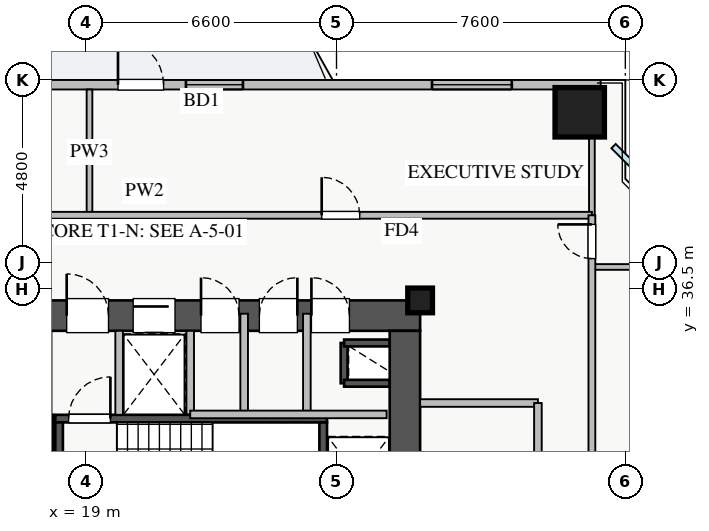
"""IFC4 building model, lengths in metres.
Left out: names, types, materials, properties, quantities, classifications, styles, units other than length and angle.
Written with IfcOpenShell. Run it as: python <this file> out.ifc"""

import sys

from ifc_helpers import new_model, si_unit, direction, frame, frame_2d, origin, origin_2d, place, context, subcontext, project, spatial, rectangle, extrude, source, transform, mapped, element, fill, save


model = new_model("IFC4")
c1 = context("Model", 3, precision=1e-05, world=origin(), true_north=direction((0.0, 1.0)))
c2 = subcontext(c1, "Body", "Model", "MODEL_VIEW")
j1 = project(units=[si_unit("LENGTHUNIT", "METRE"), si_unit("PLANEANGLEUNIT", "RADIAN")], contexts=[c1])
p1 = place(None, origin())
s1 = spatial("IfcSite", under=j1, at=p1, CompositionType="ELEMENT")
p2 = place(p1, origin())
s2 = spatial("IfcBuilding", under=s1, at=p2, CompositionType="ELEMENT")
p3 = place(p2, frame((0.0, 0.0, 29.5)))
s3 = spatial("IfcBuildingStorey", under=s2, at=p3, CompositionType="ELEMENT", Elevation=29.5)
p4 = place(p3, frame((25.8, 34.02, 0.0), z_axis=(0.0, 0.0, 1.0), x_axis=(0.0, 1.0, 0.0)))
e1 = element("IfcWall", 1, at=p4, inside=s3, PredefinedType="SHEAR", context=c2, shape_type="SweptSolid", body=[
    extrude(rectangle(XDim=1.06, YDim=0.18, at=frame_2d((0.53, 0.0))), origin(), (0.0, 0.0, 1.0), 3.07),
])
for number, where, z_axis, x_axis in (
    (2, (25.8, 35.08, 0.0), (0.0, 0.0, 1.0), (1.0, 0.0, 0.0)),
    (3, (25.8, 34.02, 0.0), (0.0, 0.0, 1.0), (1.0, 0.0, 0.0)),
):
    element("IfcWall", number, at=place(p3, frame(where, z_axis=z_axis, x_axis=x_axis)), inside=s3, PredefinedType="SHEAR", context=c2, shape_type="SweptSolid", body=[
        extrude(rectangle(XDim=1.2, YDim=0.18, at=frame_2d((0.6, 0.0))), origin(), (0.0, 0.0, 1.0), 3.07),
    ])
p5 = place(p3, frame((19.88, 33.2, 0.0), z_axis=(0.0, 0.0, 1.0), x_axis=(1.0, 0.0, 0.0)))
e4 = element("IfcWall", 4, at=p5, inside=s3, PredefinedType="SHEAR", context=c2, shape_type="SweptSolid", body=[
    extrude(rectangle(XDim=1.87, YDim=0.18, at=frame_2d((0.935, 0.0))), origin(), (0.0, 0.0, 1.0), 3.07),
])
p6 = place(p3, frame((11.0, 33.09, 0.0), z_axis=(0.0, 0.0, 1.0), x_axis=(1.0, 0.0, 0.0)))
e5 = element("IfcWall", 5, at=p6, inside=s3, PredefinedType="SHEAR", context=c2, shape_type="SweptSolid", body=[
    extrude(rectangle(XDim=7.15, YDim=0.2, at=frame_2d((3.575, 0.0))), origin(), (0.0, 0.0, 1.0), 3.25),
])
p7 = place(p6, frame((0.35, 0.0, 0.0)))
e6 = element("IfcOpeningElement", 6, at=p7, cuts=e5, PredefinedType="OPENING", context=c2, shape_type="SweptSolid", body=[
    extrude(rectangle(XDim=1.1, YDim=2.05, at=frame_2d((0.55, 1.025))), frame((0.0, 0.11, 0.0), z_axis=(0.0, -1.0, 0.0), x_axis=(1.0, 0.0, 0.0)), (0.0, 0.0, 1.0), 0.22),
])
p8 = place(p3, frame((18.05, 30.05, 0.0), z_axis=(0.0, 0.0, 1.0), x_axis=(0.0, 1.0, 0.0)))
e7 = element("IfcWall", 7, at=p8, inside=s3, PredefinedType="SHEAR", context=c2, shape_type="SweptSolid", body=[
    extrude(rectangle(XDim=2.94, YDim=0.2, at=frame_2d((1.47, 0.0))), origin(), (0.0, 0.0, 1.0), 3.25),
])
p9 = place(p3, frame((18.2, 33.09, 0.0), z_axis=(0.0, 0.0, 1.0), x_axis=(1.0, 0.0, 0.0)))
e8 = element("IfcWall", 8, at=p9, inside=s3, PredefinedType="SHEAR", context=c2, shape_type="SweptSolid", body=[
    extrude(rectangle(XDim=7.15, YDim=0.2, at=frame_2d((3.575, 0.0))), origin(), (0.0, 0.0, 1.0), 3.25),
])
p10 = place(p9, frame((0.35, 0.0, 0.0)))
e9 = element("IfcOpeningElement", 9, at=p10, cuts=e8, PredefinedType="OPENING", context=c2, shape_type="SweptSolid", body=[
    extrude(rectangle(XDim=1.1, YDim=2.05, at=frame_2d((0.55, 1.025))), frame((0.0, 0.11, 0.0), z_axis=(0.0, -1.0, 0.0), x_axis=(1.0, 0.0, 0.0)), (0.0, 0.0, 1.0), 0.22),
])
for number, where, z_axis, x_axis in (
    (10, (18.3, 30.05, 0.0), (0.0, 0.0, 1.0), (0.0, 1.0, 0.0)),
    (11, (25.25, 30.05, 0.0), (0.0, 0.0, 1.0), (0.0, 1.0, 0.0)),
):
    element("IfcWall", number, at=place(p3, frame(where, z_axis=z_axis, x_axis=x_axis)), inside=s3, PredefinedType="SHEAR", context=c2, shape_type="SweptSolid", body=[
        extrude(rectangle(XDim=2.94, YDim=0.2, at=frame_2d((1.47, 0.0))), origin(), (0.0, 0.0, 1.0), 3.25),
    ])
p11 = place(p3, frame((10.2, 35.8, 0.0), z_axis=(0.0, 0.0, 1.0), x_axis=(1.0, 0.0, 0.0)))
e12 = element("IfcWall", 12, at=p11, inside=s3, PredefinedType="SHEAR", context=c2, shape_type="SweptSolid", body=[
    extrude(rectangle(XDim=17.6, YDim=0.8, at=frame_2d((8.8, 0.0))), origin(), (0.0, 0.0, 1.0), 3.25),
])
p12 = place(p11, frame((1.15, 0.0, 0.0)))
e13 = element("IfcOpeningElement", 13, at=p12, cuts=e12, PredefinedType="OPENING", context=c2, shape_type="SweptSolid", body=[
    extrude(rectangle(XDim=1.1, YDim=2.05, at=frame_2d((0.55, 1.025))), frame((0.0, 0.41, 0.0), z_axis=(0.0, -1.0, 0.0), x_axis=(1.0, 0.0, 0.0)), (0.0, 0.0, 1.0), 0.82),
])
p13 = place(p11, frame((8.3, 0.0, 0.0)))
e14 = element("IfcOpeningElement", 14, at=p13, cuts=e12, PredefinedType="OPENING", context=c2, shape_type="SweptSolid", body=[
    extrude(rectangle(XDim=1.1, YDim=2.05, at=frame_2d((0.55, 1.025))), frame((0.0, 0.41, 0.0), z_axis=(0.0, -1.0, 0.0), x_axis=(1.0, 0.0, 0.0)), (0.0, 0.0, 1.0), 0.82),
])
p14 = place(p11, frame((10.05, 0.0, 0.0)))
e15 = element("IfcOpeningElement", 15, at=p14, cuts=e12, PredefinedType="OPENING", context=c2, shape_type="SweptSolid", body=[
    extrude(rectangle(XDim=1.1, YDim=2.05, at=frame_2d((0.55, 1.025))), frame((0.0, 0.41, 0.0), z_axis=(0.0, -1.0, 0.0), x_axis=(1.0, 0.0, 0.0)), (0.0, 0.0, 1.0), 0.82),
])
p15 = place(p11, frame((14.74, 0.0, 0.0)))
e16 = element("IfcOpeningElement", 16, at=p15, cuts=e12, PredefinedType="OPENING", context=c2, shape_type="SweptSolid", body=[
    extrude(rectangle(XDim=1.0, YDim=2.05, at=frame_2d((0.5, 1.025))), frame((0.0, 0.41, 0.0), z_axis=(0.0, -1.0, 0.0), x_axis=(1.0, 0.0, 0.0)), (0.0, 0.0, 1.0), 0.82),
])
p16 = place(p11, frame((11.835, 0.0, 0.0)))
e17 = element("IfcOpeningElement", 17, at=p16, cuts=e12, PredefinedType="OPENING", context=c2, shape_type="SweptSolid", body=[
    extrude(rectangle(XDim=1.0, YDim=2.05, at=frame_2d((0.5, 1.025))), frame((0.0, 0.41, 0.0), z_axis=(0.0, -1.0, 0.0), x_axis=(1.0, 0.0, 0.0)), (0.0, 0.0, 1.0), 0.82),
])
p17 = place(p11, frame((13.37, 0.0, 0.0)))
e18 = element("IfcOpeningElement", 18, at=p17, cuts=e12, PredefinedType="OPENING", context=c2, shape_type="SweptSolid", body=[
    extrude(rectangle(XDim=1.0, YDim=2.05, at=frame_2d((0.5, 1.025))), frame((0.0, 0.41, 0.0), z_axis=(0.0, -1.0, 0.0), x_axis=(1.0, 0.0, 0.0)), (0.0, 0.0, 1.0), 0.82),
])
p18 = place(p3, frame((27.4, 29.8, 0.0), z_axis=(0.0, 0.0, 1.0), x_axis=(0.0, 1.0, 0.0)))
e19 = element("IfcWall", 19, at=p18, inside=s3, PredefinedType="SHEAR", context=c2, shape_type="SweptSolid", body=[
    extrude(rectangle(XDim=5.6, YDim=0.8, at=frame_2d((2.8, 0.0))), origin(), (0.0, 0.0, 1.0), 3.25),
])
p19 = place(p18, frame((1.1, 0.0, 0.0)))
e20 = element("IfcOpeningElement", 20, at=p19, cuts=e19, PredefinedType="OPENING", context=c2, shape_type="SweptSolid", body=[
    extrude(rectangle(XDim=1.3, YDim=2.05, at=frame_2d((0.65, 1.025))), frame((0.0, 0.41, 0.0), z_axis=(0.0, -1.0, 0.0), x_axis=(1.0, 0.0, 0.0)), (0.0, 0.0, 1.0), 0.82),
])
m1 = source(origin(), c2, "Body", "SweptSolid", [
    extrude(rectangle(XDim=0.65, YDim=0.65, at=origin_2d()), origin(), (0.0, 0.0, 1.0), 3.25),
])
p20 = place(p3, frame((27.8, 36.2, 0.0), z_axis=(0.0, 0.0, 1.0), x_axis=(1.0, 0.0, 0.0)))
e21 = element("IfcColumn", 21, at=p20, inside=s3, PredefinedType="PILASTER", context=c2, shape_type="MappedRepresentation", body=[
    mapped(m1, transform((0.0, 0.0, 0.0), x_axis=(1.0, 0.0, 0.0), y_axis=(0.0, 1.0, 0.0), z_axis=(0.0, 0.0, 1.0), scale=1.0)),
])
m2 = source(origin(), c2, "Body", "SweptSolid", [
    extrude(rectangle(XDim=1.3, YDim=1.3, at=origin_2d()), origin(), (0.0, 0.0, 1.0), 3.25),
])
p21 = place(p3, frame((32.0, 41.15, 0.0), z_axis=(0.0, 0.0, 1.0), x_axis=(1.0, 0.0, 0.0)))
e22 = element("IfcColumn", 22, at=p21, inside=s3, PredefinedType="COLUMN", context=c2, shape_type="MappedRepresentation", body=[
    mapped(m2, transform((0.0, 0.0, 0.0), x_axis=(1.0, 0.0, 0.0), y_axis=(0.0, 1.0, 0.0), z_axis=(0.0, 0.0, 1.0), scale=1.0)),
])
p22 = place(p3, frame((5.45, 41.875, 0.0), z_axis=(0.0, 0.0, 1.0), x_axis=(1.0, 0.0, 0.0)))
e23 = element("IfcWall", 23, at=p22, inside=s3, PredefinedType="STANDARD", context=c2, shape_type="SweptSolid", body=[
    extrude(rectangle(XDim=27.1, YDim=0.25, at=frame_2d((13.55, 0.0))), origin(), (0.0, 0.0, 1.0), 2.61),
])
p23 = place(p22, frame((14.4, 0.0, 0.0)))
e24 = element("IfcOpeningElement", 24, at=p23, cuts=e23, PredefinedType="OPENING", context=c2, shape_type="SweptSolid", body=[
    extrude(rectangle(XDim=1.2, YDim=2.1, at=frame_2d((0.6, 1.05))), frame((0.0, 0.135, 0.0), z_axis=(0.0, -1.0, 0.0), x_axis=(1.0, 0.0, 0.0)), (0.0, 0.0, 1.0), 0.27),
])
p24 = place(p22, frame((1.48, 0.0, 0.9)))
e25 = element("IfcOpeningElement", 25, at=p24, cuts=e23, PredefinedType="OPENING", context=c2, shape_type="SweptSolid", body=[
    extrude(rectangle(XDim=1.5, YDim=1.5, at=frame_2d((0.75, 0.75))), frame((0.0, 0.135, 0.0), z_axis=(0.0, -1.0, 0.0), x_axis=(1.0, 0.0, 0.0)), (0.0, 0.0, 1.0), 0.27),
])
p25 = place(p22, frame((9.263, 0.0, 0.9)))
e26 = element("IfcOpeningElement", 26, at=p25, cuts=e23, PredefinedType="OPENING", context=c2, shape_type="SweptSolid", body=[
    extrude(rectangle(XDim=1.8, YDim=1.45, at=frame_2d((0.9, 0.725))), frame((0.0, 0.135, 0.0), z_axis=(0.0, -1.0, 0.0), x_axis=(1.0, 0.0, 0.0)), (0.0, 0.0, 1.0), 0.27),
])
p26 = place(p22, frame((16.188, 0.0, 0.9)))
e27 = element("IfcOpeningElement", 27, at=p26, cuts=e23, PredefinedType="OPENING", context=c2, shape_type="SweptSolid", body=[
    extrude(rectangle(XDim=1.5, YDim=1.45, at=frame_2d((0.75, 0.725))), frame((0.0, 0.135, 0.0), z_axis=(0.0, -1.0, 0.0), x_axis=(1.0, 0.0, 0.0)), (0.0, 0.0, 1.0), 0.27),
])
p27 = place(p22, frame((22.663, 0.0, 0.9)))
e28 = element("IfcOpeningElement", 28, at=p27, cuts=e23, PredefinedType="OPENING", context=c2, shape_type="SweptSolid", body=[
    extrude(rectangle(XDim=2.1, YDim=1.48, at=frame_2d((1.05, 0.74))), frame((0.0, 0.135, 0.0), z_axis=(0.0, -1.0, 0.0), x_axis=(1.0, 0.0, 0.0)), (0.0, 0.0, 1.0), 0.27),
])
p28 = place(p22, frame((5.114, 0.0, 0.9)))
e29 = element("IfcOpeningElement", 29, at=p28, cuts=e23, PredefinedType="OPENING", context=c2, shape_type="SweptSolid", body=[
    extrude(rectangle(XDim=2.4, YDim=1.5, at=frame_2d((1.2, 0.75))), frame((0.0, 0.135, 0.0), z_axis=(0.0, -1.0, 0.0), x_axis=(1.0, 0.0, 0.0)), (0.0, 0.0, 1.0), 0.27),
])
p29 = place(p3, frame((27.8, 33.5, 0.0), z_axis=(0.0, 0.0, 1.0), x_axis=(1.0, 0.0, 0.0)))
e30 = element("IfcWall", 30, at=p29, inside=s3, PredefinedType="PARTITIONING", context=c2, shape_type="SweptSolid", body=[
    extrude(rectangle(XDim=3.1, YDim=0.2, at=frame_2d((1.55, 0.0))), origin(), (0.0, 0.0, 1.0), 3.07),
])
p30 = place(p3, frame((30.9, 29.6, 0.0), z_axis=(0.0, 0.0, 1.0), x_axis=(0.0, 1.0, 0.0)))
e31 = element("IfcWall", 31, at=p30, inside=s3, PredefinedType="PARTITIONING", context=c2, shape_type="SweptSolid", body=[
    extrude(rectangle(XDim=3.9, YDim=0.2, at=frame_2d((1.95, 0.0))), origin(), (0.0, 0.0, 1.0), 3.07),
])
p31 = place(p30, frame((1.4, 0.0, 0.0)))
e32 = element("IfcOpeningElement", 32, at=p31, cuts=e31, PredefinedType="OPENING", context=c2, shape_type="SweptSolid", body=[
    extrude(rectangle(XDim=1.1, YDim=2.05, at=frame_2d((0.55, 1.025))), frame((0.0, 0.11, 0.0), z_axis=(0.0, -1.0, 0.0), x_axis=(1.0, 0.0, 0.0)), (0.0, 0.0, 1.0), 0.22),
])
p32 = place(p3, frame((19.88, 33.19, 0.0), z_axis=(0.0, 0.0, 1.0), x_axis=(0.0, 1.0, 0.0)))
e33 = element("IfcWall", 33, at=p32, inside=s3, PredefinedType="PARTITIONING", context=c2, shape_type="SweptSolid", body=[
    extrude(rectangle(XDim=2.21, YDim=0.2, at=frame_2d((1.105, 0.0))), origin(), (0.0, 0.0, 1.0), 3.07),
])
p33 = place(p3, frame((24.82, 33.2, 0.0), z_axis=(0.0, 0.0, 1.0), x_axis=(0.0, 1.0, 0.0)))
e34 = element("IfcWall", 34, at=p33, inside=s3, PredefinedType="PARTITIONING", context=c2, shape_type="SweptSolid", body=[
    extrude(rectangle(XDim=2.65, YDim=0.2, at=frame_2d((1.325, 0.0))), origin(), (0.0, 0.0, 1.0), 3.07),
])
p34 = place(p3, frame((21.75, 33.2, 0.0), z_axis=(0.0, 0.0, 1.0), x_axis=(0.0, 1.0, 0.0)))
e35 = element("IfcWall", 35, at=p34, inside=s3, PredefinedType="PARTITIONING", context=c2, shape_type="SweptSolid", body=[
    extrude(rectangle(XDim=2.2, YDim=0.2, at=frame_2d((1.1, 0.0))), origin(), (0.0, 0.0, 1.0), 3.07),
])
p35 = place(p3, frame((23.17, 33.2, 0.0), z_axis=(0.0, 0.0, 1.0), x_axis=(0.0, 1.0, 0.0)))
e36 = element("IfcWall", 36, at=p35, inside=s3, PredefinedType="PARTITIONING", context=c2, shape_type="SweptSolid", body=[
    extrude(rectangle(XDim=2.65, YDim=0.2, at=frame_2d((1.325, 0.0))), origin(), (0.0, 0.0, 1.0), 3.07),
])
p36 = place(p3, frame((21.75, 33.2, 0.0), z_axis=(0.0, 0.0, 1.0), x_axis=(1.0, 0.0, 0.0)))
e37 = element("IfcWall", 37, at=p36, inside=s3, PredefinedType="PARTITIONING", context=c2, shape_type="SweptSolid", body=[
    extrude(rectangle(XDim=5.17, YDim=0.2, at=frame_2d((2.585, 0.0))), origin(), (0.0, 0.0, 1.0), 3.07),
])
p37 = place(p3, frame((19.1, 38.44, 0.0), z_axis=(0.0, 0.0, 1.0), x_axis=(0.0, 1.0, 0.0)))
e38 = element("IfcWall", 38, at=p37, inside=s3, PredefinedType="PARTITIONING", context=c2, shape_type="SweptSolid", body=[
    extrude(rectangle(XDim=3.31, YDim=0.15, at=frame_2d((1.655, 0.0))), origin(), (0.0, 0.0, 1.0), 2.765),
])
p38 = place(p3, frame((32.32, 38.44, 0.0), z_axis=(0.0, 0.0, 1.0), x_axis=(0.0, 1.0, 0.0)))
e39 = element("IfcWall", 39, at=p38, inside=s3, PredefinedType="PARTITIONING", context=c2, shape_type="SweptSolid", body=[
    extrude(rectangle(XDim=3.31, YDim=0.15, at=frame_2d((1.655, 0.0))), origin(), (0.0, 0.0, 1.0), 3.07),
])
p39 = place(p3, frame((8.78, 38.44, 0.0), z_axis=(0.0, 0.0, 1.0), x_axis=(1.0, 0.0, 0.0)))
e40 = element("IfcWall", 40, at=p39, inside=s3, PredefinedType="PARTITIONING", context=c2, shape_type="SweptSolid", body=[
    extrude(rectangle(XDim=23.54, YDim=0.18, at=frame_2d((11.77, 0.0))), origin(), (0.0, 0.0, 1.0), 3.07),
])
p40 = place(p39, frame((4.66, 0.0, 0.0)))
e41 = element("IfcOpeningElement", 41, at=p40, cuts=e40, PredefinedType="OPENING", context=c2, shape_type="SweptSolid", body=[
    extrude(rectangle(XDim=1.0, YDim=2.05, at=frame_2d((0.5, 1.025))), frame((0.0, 0.1, 0.0), z_axis=(0.0, -1.0, 0.0), x_axis=(1.0, 0.0, 0.0)), (0.0, 0.0, 1.0), 0.2),
])
p41 = place(p39, frame((16.43, 0.0, 0.0)))
e42 = element("IfcOpeningElement", 42, at=p41, cuts=e40, PredefinedType="OPENING", context=c2, shape_type="SweptSolid", body=[
    extrude(rectangle(XDim=1.0, YDim=2.05, at=frame_2d((0.5, 1.025))), frame((0.0, 0.1, 0.0), z_axis=(0.0, -1.0, 0.0), x_axis=(1.0, 0.0, 0.0)), (0.0, 0.0, 1.0), 0.2),
])
p42 = place(p3, frame((32.32, 37.08, 0.0), z_axis=(0.0, 0.0, 1.0), x_axis=(1.0, 0.0, 0.0)))
e43 = element("IfcWall", 43, at=p42, inside=s3, PredefinedType="PARTITIONING", context=c2, shape_type="SweptSolid", body=[
    extrude(rectangle(XDim=5.43, YDim=0.15, at=frame_2d((2.715, 0.0))), origin(), (0.0, 0.0, 1.0), 3.07),
])
p43 = place(p3, frame((32.32, 7.21, 0.0), z_axis=(0.0, 0.0, 1.0), x_axis=(0.0, 1.0, 0.0)))
e44 = element("IfcWall", 44, at=p43, inside=s3, PredefinedType="PARTITIONING", context=c2, shape_type="SweptSolid", body=[
    extrude(rectangle(XDim=31.23, YDim=0.18, at=frame_2d((15.615, 0.0))), origin(), (0.0, 0.0, 1.0), 2.765),
])
p44 = place(p43, frame((30.09, 0.0, 0.0)))
e45 = element("IfcOpeningElement", 45, at=p44, cuts=e44, PredefinedType="OPENING", context=c2, shape_type="SweptSolid", body=[
    extrude(rectangle(XDim=0.9, YDim=2.05, at=frame_2d((0.45, 1.025))), frame((0.0, 0.1, 0.0), z_axis=(0.0, -1.0, 0.0), x_axis=(1.0, 0.0, 0.0)), (0.0, 0.0, 1.0), 0.2),
])
p45 = place(p43, frame((0.415, 0.0, 0.0)))
e46 = element("IfcOpeningElement", 46, at=p45, cuts=e44, PredefinedType="OPENING", context=c2, shape_type="SweptSolid", body=[
    extrude(rectangle(XDim=0.9, YDim=2.05, at=frame_2d((0.45, 1.025))), frame((0.0, 0.1, 0.0), z_axis=(0.0, -1.0, 0.0), x_axis=(1.0, 0.0, 0.0)), (0.0, 0.0, 1.0), 0.2),
])
p46 = place(p43, frame((8.575, 0.0, 0.0)))
e47 = element("IfcOpeningElement", 47, at=p46, cuts=e44, PredefinedType="OPENING", context=c2, shape_type="SweptSolid", body=[
    extrude(rectangle(XDim=1.0, YDim=2.05, at=frame_2d((0.5, 1.025))), frame((0.0, 0.1, 0.0), z_axis=(0.0, -1.0, 0.0), x_axis=(1.0, 0.0, 0.0)), (0.0, 0.0, 1.0), 0.2),
])
p47 = place(p43, frame((19.375, 0.0, 0.0)))
e48 = element("IfcOpeningElement", 48, at=p47, cuts=e44, PredefinedType="OPENING", context=c2, shape_type="SweptSolid", body=[
    extrude(rectangle(XDim=1.0, YDim=2.05, at=frame_2d((0.5, 1.025))), frame((0.0, 0.1, 0.0), z_axis=(0.0, -1.0, 0.0), x_axis=(1.0, 0.0, 0.0)), (0.0, 0.0, 1.0), 0.2),
])
m3 = source(origin(), c2, "Body", "SweptSolid", [
    extrude(rectangle(XDim=1.2, YDim=2.1, at=frame_2d((0.6, 1.05))), frame((0.0, 0.025, 0.0), z_axis=(0.0, -1.0, 0.0), x_axis=(1.0, 0.0, 0.0)), (0.0, 0.0, 1.0), 0.05),
])
p48 = place(p23, origin())
e49 = element("IfcDoor", 49, at=p48, inside=s3, OperationType="SINGLE_SWING_LEFT", PredefinedType="DOOR", context=c2, shape_type="MappedRepresentation", body=[
    mapped(m3, transform((0.0, 0.0, 0.0), x_axis=(1.0, 0.0, 0.0), y_axis=(0.0, 1.0, 0.0), z_axis=(0.0, 0.0, 1.0), scale=1.0)),
])
fill(e24, e49)
m4 = source(origin(), c2, "Body", "SweptSolid", [
    extrude(rectangle(XDim=1.5, YDim=1.45, at=frame_2d((0.75, 0.725))), frame((0.0, 0.03, 0.0), z_axis=(0.0, -1.0, 0.0), x_axis=(1.0, 0.0, 0.0)), (0.0, 0.0, 1.0), 0.06),
])
p49 = place(p26, origin())
e50 = element("IfcWindow", 50, at=p49, inside=s3, PartitioningType="DOUBLE_PANEL_VERTICAL", PredefinedType="WINDOW", context=c2, shape_type="MappedRepresentation", body=[
    mapped(m4, transform((0.0, 0.0, 0.0), x_axis=(1.0, 0.0, 0.0), y_axis=(0.0, 1.0, 0.0), z_axis=(0.0, 0.0, 1.0), scale=1.0)),
])
fill(e27, e50)
m5 = source(origin(), c2, "Body", "SweptSolid", [
    extrude(rectangle(XDim=2.1, YDim=1.48, at=frame_2d((1.05, 0.74))), frame((0.0, 0.03, 0.0), z_axis=(0.0, -1.0, 0.0), x_axis=(1.0, 0.0, 0.0)), (0.0, 0.0, 1.0), 0.06),
])
p50 = place(p27, origin())
e51 = element("IfcWindow", 51, at=p50, inside=s3, PartitioningType="TRIPLE_PANEL_VERTICAL", PredefinedType="WINDOW", context=c2, shape_type="MappedRepresentation", body=[
    mapped(m5, transform((0.0, 0.0, 0.0), x_axis=(1.0, 0.0, 0.0), y_axis=(0.0, 1.0, 0.0), z_axis=(0.0, 0.0, 1.0), scale=1.0)),
])
fill(e28, e51)
m6 = source(origin(), c2, "Body", "SweptSolid", [
    extrude(rectangle(XDim=1.1, YDim=2.05, at=frame_2d((0.55, 1.025))), frame((0.0, 0.025, 0.0), z_axis=(0.0, -1.0, 0.0), x_axis=(1.0, 0.0, 0.0)), (0.0, 0.0, 1.0), 0.05),
])
p51 = place(p13, origin())
e52 = element("IfcDoor", 52, at=p51, inside=s3, OperationType="SINGLE_SWING_LEFT", PredefinedType="DOOR", context=c2, shape_type="MappedRepresentation", body=[
    mapped(m6, transform((0.0, 0.0, 0.0), x_axis=(1.0, 0.0, 0.0), y_axis=(0.0, 1.0, 0.0), z_axis=(0.0, 0.0, 1.0), scale=1.0)),
])
fill(e14, e52)
p52 = place(p10, origin())
e53 = element("IfcDoor", 53, at=p52, inside=s3, OperationType="SINGLE_SWING_RIGHT", PredefinedType="DOOR", context=c2, shape_type="MappedRepresentation", body=[
    mapped(m6, transform((0.0, 0.0, 0.0), x_axis=(1.0, 0.0, 0.0), y_axis=(0.0, 1.0, 0.0), z_axis=(0.0, 0.0, 1.0), scale=1.0)),
])
fill(e9, e53)
p53 = place(p14, origin())
e54 = element("IfcDoor", 54, at=p53, inside=s3, OperationType="SLIDING_TO_LEFT", PredefinedType="DOOR", context=c2, shape_type="MappedRepresentation", body=[
    mapped(m6, transform((0.0, 0.0, 0.0), x_axis=(1.0, 0.0, 0.0), y_axis=(0.0, 1.0, 0.0), z_axis=(0.0, 0.0, 1.0), scale=1.0)),
])
fill(e15, e54)
m7 = source(origin(), c2, "Body", "SweptSolid", [
    extrude(rectangle(XDim=1.0, YDim=2.05, at=frame_2d((0.5, 1.025))), frame((0.0, 0.025, 0.0), z_axis=(0.0, -1.0, 0.0), x_axis=(1.0, 0.0, 0.0)), (0.0, 0.0, 1.0), 0.05),
])
p54 = place(p15, origin())
e55 = element("IfcDoor", 55, at=p54, inside=s3, OperationType="SINGLE_SWING_LEFT", PredefinedType="DOOR", context=c2, shape_type="MappedRepresentation", body=[
    mapped(m7, transform((0.0, 0.0, 0.0), x_axis=(1.0, 0.0, 0.0), y_axis=(0.0, 1.0, 0.0), z_axis=(0.0, 0.0, 1.0), scale=1.0)),
])
fill(e16, e55)
p55 = place(p16, origin())
e56 = element("IfcDoor", 56, at=p55, inside=s3, OperationType="SINGLE_SWING_LEFT", PredefinedType="DOOR", context=c2, shape_type="MappedRepresentation", body=[
    mapped(m7, transform((0.0, 0.0, 0.0), x_axis=(1.0, 0.0, 0.0), y_axis=(0.0, 1.0, 0.0), z_axis=(0.0, 0.0, 1.0), scale=1.0)),
])
fill(e17, e56)
p56 = place(p17, origin())
e57 = element("IfcDoor", 57, at=p56, inside=s3, OperationType="SINGLE_SWING_RIGHT", PredefinedType="DOOR", context=c2, shape_type="MappedRepresentation", body=[
    mapped(m7, transform((0.0, 0.0, 0.0), x_axis=(1.0, 0.0, 0.0), y_axis=(0.0, 1.0, 0.0), z_axis=(0.0, 0.0, 1.0), scale=1.0)),
])
fill(e18, e57)
p57 = place(p41, origin())
e58 = element("IfcDoor", 58, at=p57, inside=s3, OperationType="SINGLE_SWING_LEFT", PredefinedType="DOOR", context=c2, shape_type="MappedRepresentation", body=[
    mapped(m7, transform((0.0, 0.0, 0.0), x_axis=(1.0, 0.0, 0.0), y_axis=(0.0, 1.0, 0.0), z_axis=(0.0, 0.0, 1.0), scale=1.0)),
])
fill(e42, e58)
m8 = source(origin(), c2, "Body", "SweptSolid", [
    extrude(rectangle(XDim=0.9, YDim=2.05, at=frame_2d((0.45, 1.025))), frame((0.0, 0.025, 0.0), z_axis=(0.0, -1.0, 0.0), x_axis=(1.0, 0.0, 0.0)), (0.0, 0.0, 1.0), 0.05),
])
p58 = place(p44, origin())
e59 = element("IfcDoor", 59, at=p58, inside=s3, OperationType="SINGLE_SWING_RIGHT", PredefinedType="DOOR", context=c2, shape_type="MappedRepresentation", body=[
    mapped(m8, transform((0.0, 0.0, 0.0), x_axis=(1.0, 0.0, 0.0), y_axis=(0.0, 1.0, 0.0), z_axis=(0.0, 0.0, 1.0), scale=1.0)),
])
fill(e45, e59)
save(model, sys.argv[1])
